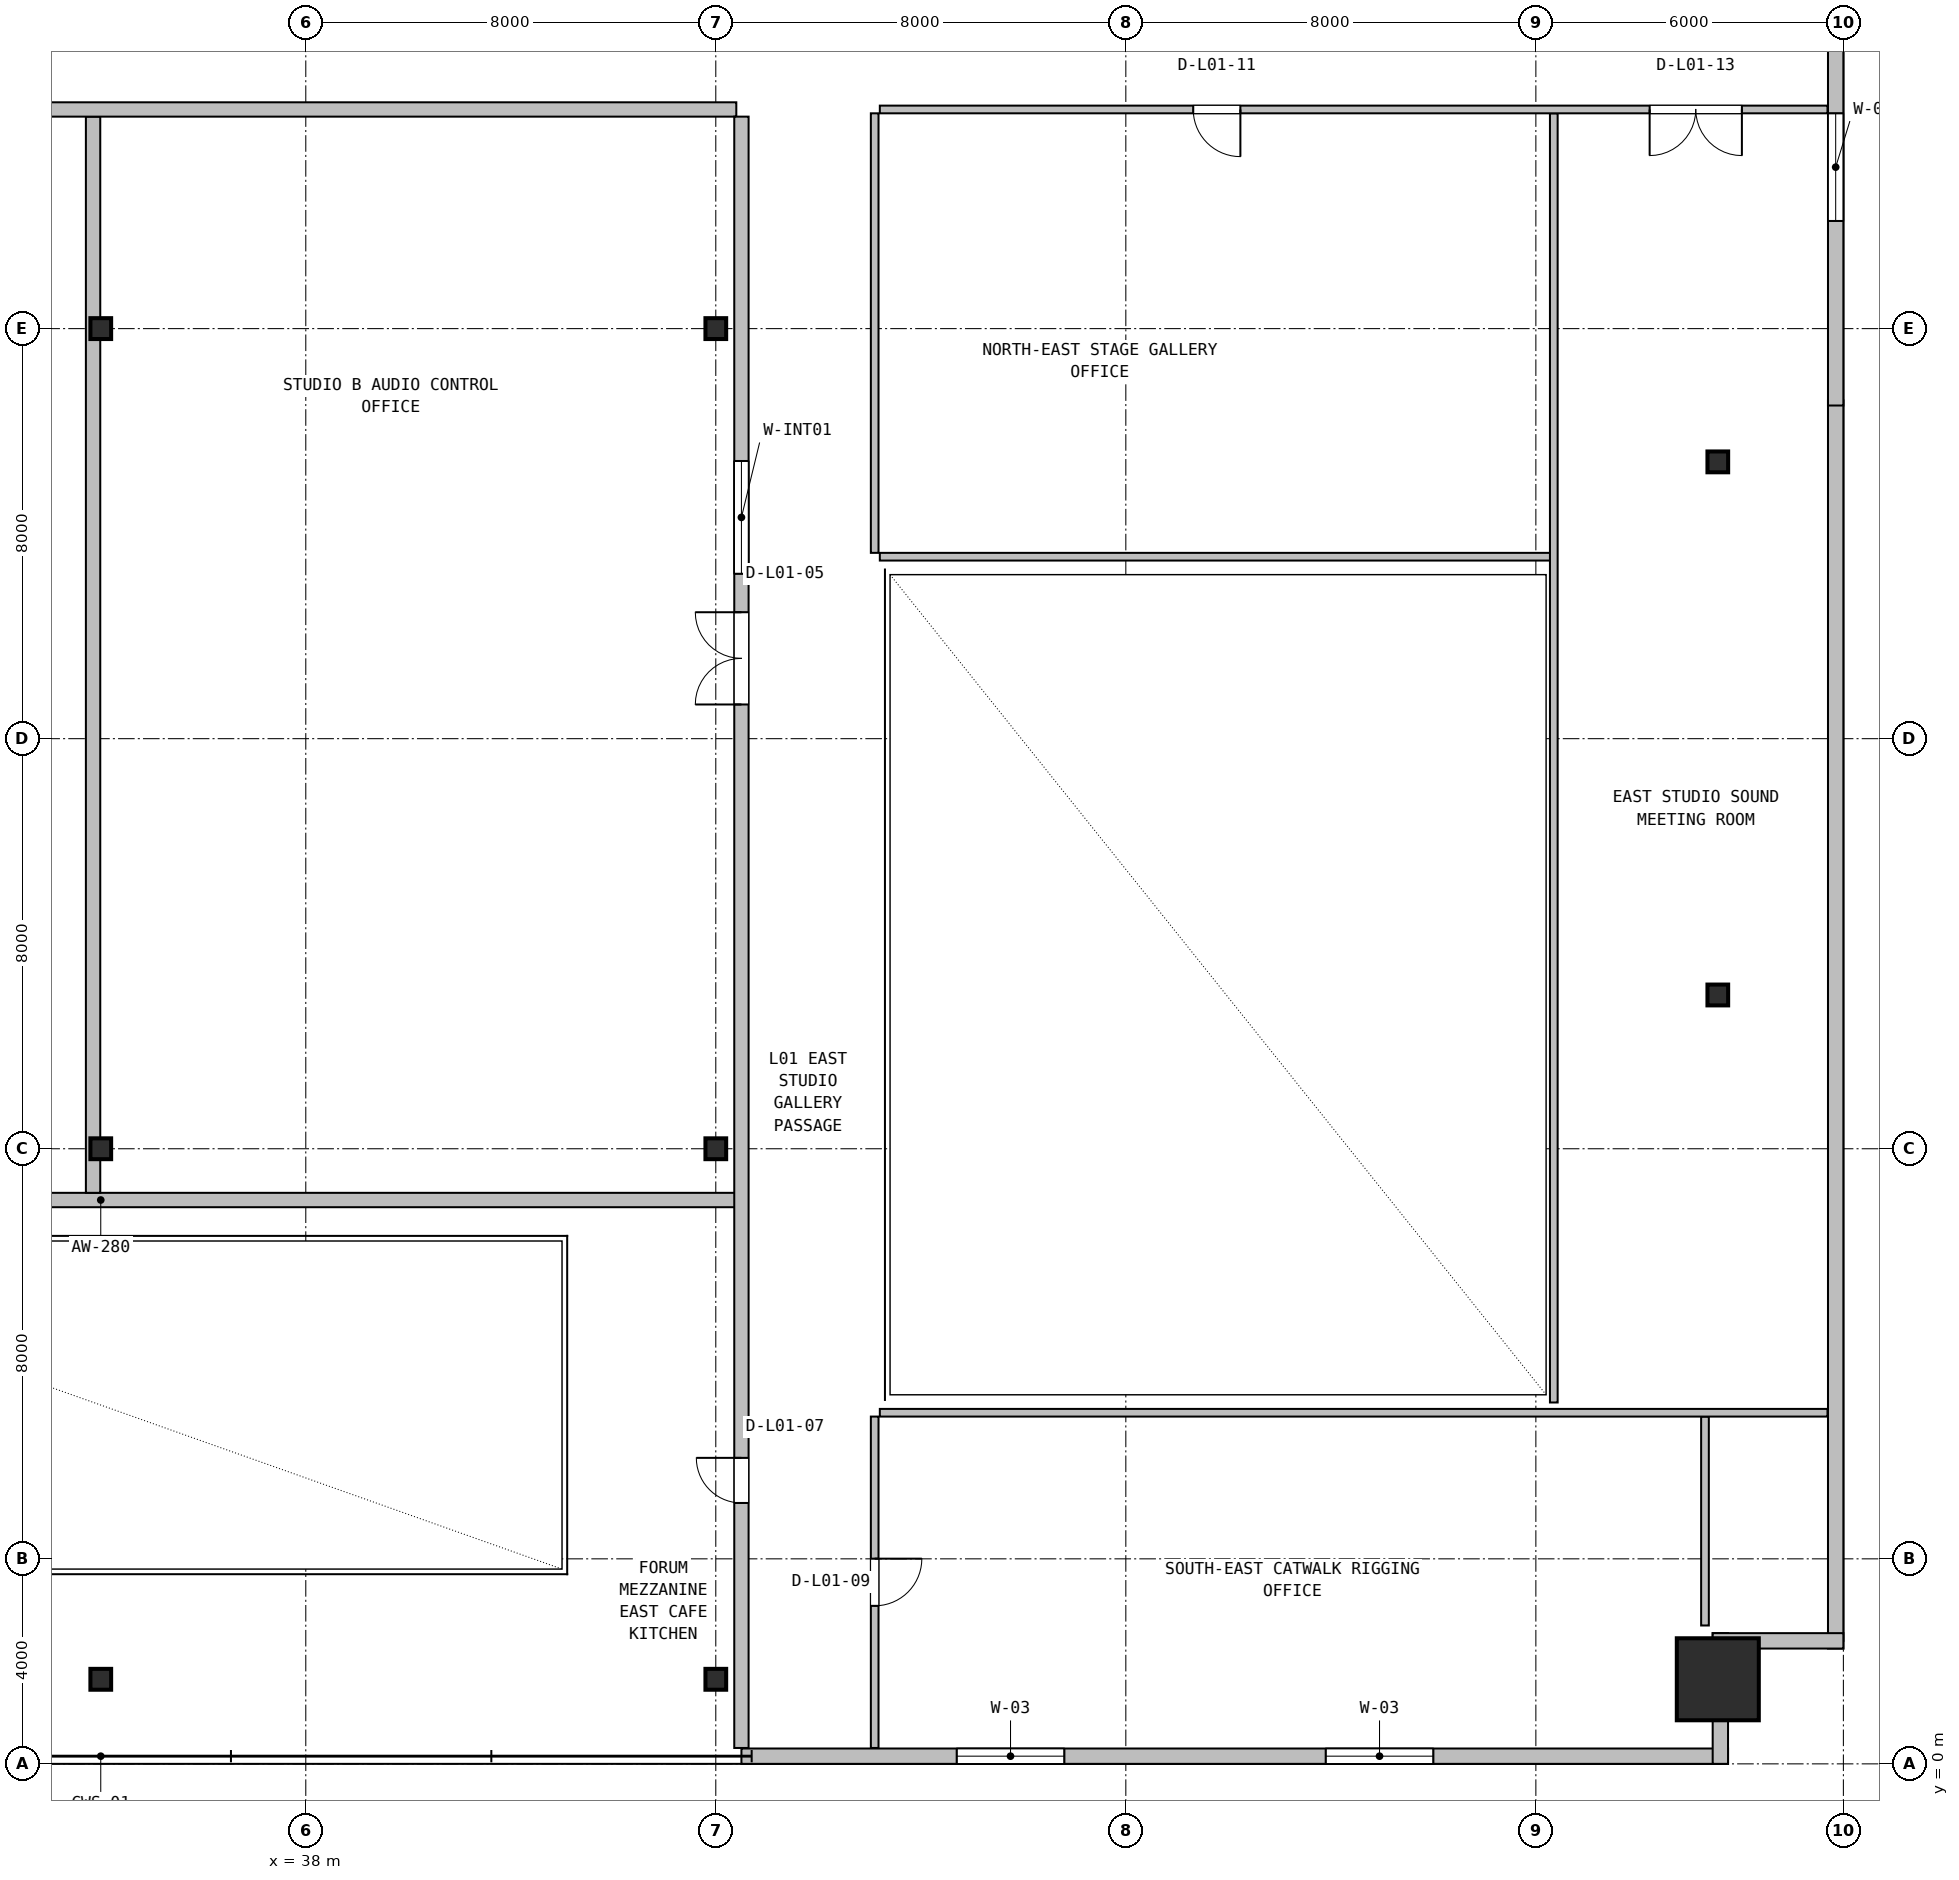
"""IFC4 building model, lengths in metres.
Left out: names, types, materials, properties, quantities, classifications, styles, units other than length and angle.
Written with IfcOpenShell. Run it as: python <this file> out.ifc"""

import sys

from ifc_helpers import new_model, si_unit, direction, frame, frame_2d, origin, origin_2d, place, context, subcontext, project, spatial, rectangle, hollow_rectangle, i_section, extrude, source, transform, mapped, element, fill, save


model = new_model("IFC4")
c1 = context("Model", 3, precision=1e-05, world=origin(), true_north=direction((0.0, 1.0)))
c2 = subcontext(c1, "Body", "Model", "MODEL_VIEW")
j1 = project(units=[si_unit("LENGTHUNIT", "METRE"), si_unit("PLANEANGLEUNIT", "RADIAN")], contexts=[c1])
p1 = place(None, origin())
s1 = spatial("IfcSite", under=j1, at=p1, CompositionType="ELEMENT")
p2 = place(p1, origin())
s2 = spatial("IfcBuilding", under=s1, at=p2, CompositionType="ELEMENT")
p3 = place(p2, frame((0.0, 0.0, 6.0)))
s3 = spatial("IfcBuildingStorey", under=s2, at=p3, CompositionType="ELEMENT", Elevation=6.0)
m1 = source(origin(), c2, "Body", "SweptSolid", [
    extrude(hollow_rectangle(XDim=1.6, YDim=1.6, WallThickness=0.06, at=origin_2d()), origin(), (0.0, 0.0, 1.0), 5.4),
])
p4 = place(p3, frame((65.55, 1.65, 0.0), z_axis=(0.0, 0.0, 1.0), x_axis=(1.0, 0.0, 0.0)))
e1 = element("IfcColumn", 1, at=p4, inside=s3, PredefinedType="COLUMN", context=c2, shape_type="MappedRepresentation", body=[
    mapped(m1, transform((0.0, 0.0, 0.0), x_axis=(1.0, 0.0, 0.0), y_axis=(0.0, 1.0, 0.0), z_axis=(0.0, 0.0, 1.0), scale=1.0)),
])
m2 = source(origin(), c2, "Body", "SweptSolid", [
    extrude(i_section(OverallWidth=0.404, OverallDepth=0.407, WebThickness=0.027, FlangeThickness=0.044, FilletRadius=0.018, at=origin_2d()), origin(), (0.0, 0.0, 1.0), 5.4),
])
for number, where, z_axis, x_axis in (
    (2, (34.0, 1.65, 0.0), (0.0, 0.0, 1.0), (1.0, 0.0, 0.0)),
    (3, (46.0, 1.65, 0.0), (0.0, 0.0, 1.0), (1.0, 0.0, 0.0)),
    (4, (34.0, 12.0, 0.0), (0.0, 0.0, 1.0), (1.0, 0.0, 0.0)),
    (5, (46.0, 12.0, 0.0), (0.0, 0.0, 1.0), (1.0, 0.0, 0.0)),
    (6, (34.0, 28.0, 0.0), (0.0, 0.0, 1.0), (1.0, 0.0, 0.0)),
    (7, (46.0, 28.0, 0.0), (0.0, 0.0, 1.0), (1.0, 0.0, 0.0)),
    (8, (65.55, 15.0, 0.0), (0.0, 0.0, 1.0), (1.0, 0.0, 0.0)),
    (9, (65.55, 25.4, 0.0), (0.0, 0.0, 1.0), (1.0, 0.0, 0.0)),
):
    element("IfcColumn", number, at=place(p3, frame(where, z_axis=z_axis, x_axis=x_axis)), inside=s3, PredefinedType="COLUMN", context=c2, shape_type="MappedRepresentation", body=[
        mapped(m2, transform((0.0, 0.0, 0.0), x_axis=(1.0, 0.0, 0.0), y_axis=(0.0, 1.0, 0.0), z_axis=(0.0, 0.0, 1.0), scale=1.0)),
    ])
p5 = place(p3, frame((46.5, 0.15, 0.0), z_axis=(0.0, 0.0, 1.0), x_axis=(1.0, 0.0, 0.0)))
e10 = element("IfcWall", 10, at=p5, inside=s3, PredefinedType="SOLIDWALL", context=c2, shape_type="SweptSolid", body=[
    extrude(rectangle(XDim=19.25, YDim=0.3, at=frame_2d((9.625, 0.0))), origin(), (0.0, 0.0, 1.0), 5.1),
])
p6 = place(p5, frame((4.2, 0.0, 0.9)))
e11 = element("IfcOpeningElement", 11, at=p6, cuts=e10, PredefinedType="OPENING", context=c2, shape_type="SweptSolid", body=[
    extrude(rectangle(XDim=2.1, YDim=2.1, at=frame_2d((1.05, 1.05))), frame((0.0, 0.16, 0.0), z_axis=(0.0, -1.0, 0.0), x_axis=(1.0, 0.0, 0.0)), (0.0, 0.0, 1.0), 0.32),
])
p7 = place(p5, frame((11.4, 0.0, 0.9)))
e12 = element("IfcOpeningElement", 12, at=p7, cuts=e10, PredefinedType="OPENING", context=c2, shape_type="SweptSolid", body=[
    extrude(rectangle(XDim=2.1, YDim=2.1, at=frame_2d((1.05, 1.05))), frame((0.0, 0.16, 0.0), z_axis=(0.0, -1.0, 0.0), x_axis=(1.0, 0.0, 0.0)), (0.0, 0.0, 1.0), 0.32),
])
p8 = place(p3, frame((67.85, 2.25, 0.0), z_axis=(0.0, 0.0, 1.0), x_axis=(0.0, 1.0, 0.0)))
e13 = element("IfcWall", 13, at=p8, inside=s3, PredefinedType="SOLIDWALL", context=c2, shape_type="SweptSolid", body=[
    extrude(rectangle(XDim=24.35, YDim=0.3, at=frame_2d((12.175, 0.0))), origin(), (0.0, 0.0, 1.0), 5.1),
])
p9 = place(p3, frame((67.85, 26.5, 0.0), z_axis=(0.0, 0.0, 1.0), x_axis=(0.0, 1.0, 0.0)))
e14 = element("IfcWall", 14, at=p9, inside=s3, PredefinedType="SOLIDWALL", context=c2, shape_type="SweptSolid", body=[
    extrude(rectangle(XDim=19.25, YDim=0.3, at=frame_2d((9.625, 0.0))), origin(), (0.0, 0.0, 1.0), 5.1),
])
p10 = place(p9, frame((3.6, 0.0, 0.9)))
e15 = element("IfcOpeningElement", 15, at=p10, cuts=e14, PredefinedType="OPENING", context=c2, shape_type="SweptSolid", body=[
    extrude(rectangle(XDim=2.1, YDim=2.1, at=frame_2d((1.05, 1.05))), frame((0.0, 0.16, 0.0), z_axis=(0.0, -1.0, 0.0), x_axis=(1.0, 0.0, 0.0)), (0.0, 0.0, 1.0), 0.32),
])
p11 = place(p9, frame((12.8, 0.0, 0.9)))
e16 = element("IfcOpeningElement", 16, at=p11, cuts=e14, PredefinedType="OPENING", context=c2, shape_type="SweptSolid", body=[
    extrude(rectangle(XDim=2.1, YDim=2.1, at=frame_2d((1.05, 1.05))), frame((0.0, 0.16, 0.0), z_axis=(0.0, -1.0, 0.0), x_axis=(1.0, 0.0, 0.0)), (0.0, 0.0, 1.0), 0.32),
])
for number, where, z_axis, x_axis in (
    (17, (65.6, 0.0, 0.0), (0.0, 0.0, 1.0), (0.0, 1.0, 0.0)),
    (18, (65.45, 2.4, 0.0), (0.0, 0.0, 1.0), (1.0, 0.0, 0.0)),
):
    element("IfcWall", number, at=place(p3, frame(where, z_axis=z_axis, x_axis=x_axis)), inside=s3, PredefinedType="SOLIDWALL", context=c2, shape_type="SweptSolid", body=[
        extrude(rectangle(XDim=2.55, YDim=0.3, at=frame_2d((1.275, 0.0))), origin(), (0.0, 0.0, 1.0), 4.183),
    ])
p12 = place(p3, frame((21.6, 11.0, 0.0), z_axis=(0.0, 0.0, 1.0), x_axis=(1.0, 0.0, 0.0)))
e19 = element("IfcWall", 19, at=p12, inside=s3, PredefinedType="SOLIDWALL", context=c2, shape_type="SweptSolid", body=[
    extrude(rectangle(XDim=24.8, YDim=0.28, at=frame_2d((12.4, 0.0))), origin(), (0.0, 0.0, 1.0), 4.183),
])
p13 = place(p3, frame((33.85, 11.14, 0.0), z_axis=(0.0, 0.0, 1.0), x_axis=(0.0, 1.0, 0.0)))
e20 = element("IfcWall", 20, at=p13, inside=s3, PredefinedType="SOLIDWALL", context=c2, shape_type="SweptSolid", body=[
    extrude(rectangle(XDim=20.995, YDim=0.28, at=frame_2d((10.498, 0.0))), origin(), (0.0, 0.0, 1.0), 4.183),
])
p14 = place(p3, frame((21.6, 32.275, 0.0), z_axis=(0.0, 0.0, 1.0), x_axis=(1.0, 0.0, 0.0)))
e21 = element("IfcWall", 21, at=p14, inside=s3, PredefinedType="SOLIDWALL", context=c2, shape_type="SweptSolid", body=[
    extrude(rectangle(XDim=24.8, YDim=0.28, at=frame_2d((12.4, 0.0))), origin(), (0.0, 0.0, 1.0), 4.183),
])
p15 = place(p3, frame((46.5, 0.31, 0.0), z_axis=(0.0, 0.0, 1.0), x_axis=(0.0, 1.0, 0.0)))
e22 = element("IfcWall", 22, at=p15, inside=s3, PredefinedType="SOLIDWALL", context=c2, shape_type="SweptSolid", body=[
    extrude(rectangle(XDim=31.825, YDim=0.28, at=frame_2d((15.913, 0.0))), origin(), (0.0, 0.0, 1.0), 4.183),
])
p16 = place(p15, frame((20.357, 0.0, 0.0)))
e23 = element("IfcOpeningElement", 23, at=p16, cuts=e22, PredefinedType="OPENING", context=c2, shape_type="SweptSolid", body=[
    extrude(rectangle(XDim=1.8, YDim=2.25, at=frame_2d((0.9, 1.125))), frame((0.0, 0.15, 0.0), z_axis=(0.0, -1.0, 0.0), x_axis=(1.0, 0.0, 0.0)), (0.0, 0.0, 1.0), 0.3),
])
p17 = place(p15, frame((22.907, 0.0, 0.95)))
e24 = element("IfcOpeningElement", 24, at=p17, cuts=e22, PredefinedType="OPENING", context=c2, shape_type="SweptSolid", body=[
    extrude(rectangle(XDim=2.2, YDim=1.3, at=frame_2d((1.1, 0.65))), frame((0.0, 0.15, 0.0), z_axis=(0.0, -1.0, 0.0), x_axis=(1.0, 0.0, 0.0)), (0.0, 0.0, 1.0), 0.3),
])
p18 = place(p15, frame((4.78, 0.0, 0.0)))
e25 = element("IfcOpeningElement", 25, at=p18, cuts=e22, PredefinedType="OPENING", context=c2, shape_type="SweptSolid", body=[
    extrude(rectangle(XDim=0.88, YDim=2.06, at=frame_2d((0.44, 1.03))), frame((0.0, 0.15, 0.0), z_axis=(0.0, -1.0, 0.0), x_axis=(1.0, 0.0, 0.0)), (0.0, 0.0, 1.0), 0.3),
])
p19 = place(p3, frame((65.3, 2.7, 0.0), z_axis=(0.0, 0.0, 1.0), x_axis=(0.0, 1.0, 0.0)))
e26 = element("IfcWall", 26, at=p19, inside=s3, PredefinedType="PARTITIONING", context=c2, shape_type="SweptSolid", body=[
    extrude(rectangle(XDim=4.075, YDim=0.15, at=frame_2d((2.038, 0.0))), origin(), (0.0, 0.0, 1.0), 4.183),
])
p20 = place(p3, frame((49.2, 6.85, 0.0), z_axis=(0.0, 0.0, 1.0), x_axis=(1.0, 0.0, 0.0)))
e27 = element("IfcWall", 27, at=p20, inside=s3, PredefinedType="PARTITIONING", context=c2, shape_type="SweptSolid", body=[
    extrude(rectangle(XDim=18.49, YDim=0.15, at=frame_2d((9.245, 0.0))), origin(), (0.0, 0.0, 1.0), 4.183),
])
p21 = place(p3, frame((49.1, 0.31, 0.0), z_axis=(0.0, 0.0, 1.0), x_axis=(0.0, 1.0, 0.0)))
e28 = element("IfcWall", 28, at=p21, inside=s3, PredefinedType="PARTITIONING", context=c2, shape_type="SweptSolid", body=[
    extrude(rectangle(XDim=6.465, YDim=0.15, at=frame_2d((3.232, 0.0))), origin(), (0.0, 0.0, 1.0), 4.183),
])
p22 = place(p21, frame((2.773, 0.0, 0.0)))
e29 = element("IfcOpeningElement", 29, at=p22, cuts=e28, PredefinedType="OPENING", context=c2, shape_type="SweptSolid", body=[
    extrude(rectangle(XDim=0.92, YDim=2.08, at=frame_2d((0.46, 1.04))), frame((0.0, 0.085, 0.0), z_axis=(0.0, -1.0, 0.0), x_axis=(1.0, 0.0, 0.0)), (0.0, 0.0, 1.0), 0.17),
])
p23 = place(p3, frame((49.2, 23.55, 0.0), z_axis=(0.0, 0.0, 1.0), x_axis=(1.0, 0.0, 0.0)))
e30 = element("IfcWall", 30, at=p23, inside=s3, PredefinedType="PARTITIONING", context=c2, shape_type="SweptSolid", body=[
    extrude(rectangle(XDim=13.15, YDim=0.15, at=frame_2d((6.575, 0.0))), origin(), (0.0, 0.0, 1.0), 5.1),
])
p24 = place(p3, frame((62.35, 7.05, 0.0), z_axis=(0.0, 0.0, 1.0), x_axis=(0.0, 1.0, 0.0)))
e31 = element("IfcWall", 31, at=p24, inside=s3, PredefinedType="PARTITIONING", context=c2, shape_type="SweptSolid", body=[
    extrude(rectangle(XDim=25.15, YDim=0.15, at=frame_2d((12.575, 0.0))), origin(), (0.0, 0.0, 1.0), 4.183),
])
p25 = place(p3, frame((49.2, 32.275, 0.0), z_axis=(0.0, 0.0, 1.0), x_axis=(1.0, 0.0, 0.0)))
e32 = element("IfcWall", 32, at=p25, inside=s3, PredefinedType="PARTITIONING", context=c2, shape_type="SweptSolid", body=[
    extrude(rectangle(XDim=18.49, YDim=0.15, at=frame_2d((9.245, 0.0))), origin(), (0.0, 0.0, 1.0), 4.183),
])
p26 = place(p25, frame((6.115, 0.0, 0.0)))
e33 = element("IfcOpeningElement", 33, at=p26, cuts=e32, PredefinedType="OPENING", context=c2, shape_type="SweptSolid", body=[
    extrude(rectangle(XDim=0.92, YDim=2.08, at=frame_2d((0.46, 1.04))), frame((0.0, 0.085, 0.0), z_axis=(0.0, -1.0, 0.0), x_axis=(1.0, 0.0, 0.0)), (0.0, 0.0, 1.0), 0.17),
])
p27 = place(p25, frame((15.02, 0.0, 0.0)))
e34 = element("IfcOpeningElement", 34, at=p27, cuts=e32, PredefinedType="OPENING", context=c2, shape_type="SweptSolid", body=[
    extrude(rectangle(XDim=1.8, YDim=2.25, at=frame_2d((0.9, 1.125))), frame((0.0, 0.085, 0.0), z_axis=(0.0, -1.0, 0.0), x_axis=(1.0, 0.0, 0.0)), (0.0, 0.0, 1.0), 0.17),
])
p28 = place(p3, frame((49.1, 23.625, 0.0), z_axis=(0.0, 0.0, 1.0), x_axis=(0.0, 1.0, 0.0)))
e35 = element("IfcWall", 35, at=p28, inside=s3, PredefinedType="PARTITIONING", context=c2, shape_type="SweptSolid", body=[
    extrude(rectangle(XDim=8.575, YDim=0.15, at=frame_2d((4.288, 0.0))), origin(), (0.0, 0.0, 1.0), 4.183),
])
m3 = source(origin(), c2, "Body", "SweptSolid", [
    extrude(rectangle(XDim=2.1, YDim=2.1, at=frame_2d((1.05, 1.05))), frame((0.0, 0.03, 0.0), z_axis=(0.0, -1.0, 0.0), x_axis=(1.0, 0.0, 0.0)), (0.0, 0.0, 1.0), 0.06),
])
p29 = place(p6, origin())
e36 = element("IfcWindow", 36, at=p29, inside=s3, PartitioningType="DOUBLE_PANEL_VERTICAL", PredefinedType="WINDOW", context=c2, shape_type="MappedRepresentation", body=[
    mapped(m3, transform((0.0, 0.0, 0.0), x_axis=(1.0, 0.0, 0.0), y_axis=(0.0, 1.0, 0.0), z_axis=(0.0, 0.0, 1.0), scale=1.0)),
])
fill(e11, e36)
p30 = place(p7, origin())
e37 = element("IfcWindow", 37, at=p30, inside=s3, PartitioningType="DOUBLE_PANEL_VERTICAL", PredefinedType="WINDOW", context=c2, shape_type="MappedRepresentation", body=[
    mapped(m3, transform((0.0, 0.0, 0.0), x_axis=(1.0, 0.0, 0.0), y_axis=(0.0, 1.0, 0.0), z_axis=(0.0, 0.0, 1.0), scale=1.0)),
])
fill(e12, e37)
p31 = place(p10, origin())
e38 = element("IfcWindow", 38, at=p31, inside=s3, PartitioningType="DOUBLE_PANEL_VERTICAL", PredefinedType="WINDOW", context=c2, shape_type="MappedRepresentation", body=[
    mapped(m3, transform((0.0, 0.0, 0.0), x_axis=(1.0, 0.0, 0.0), y_axis=(0.0, 1.0, 0.0), z_axis=(0.0, 0.0, 1.0), scale=1.0)),
])
fill(e15, e38)
m4 = source(origin(), c2, "Body", "SweptSolid", [
    extrude(rectangle(XDim=1.8, YDim=2.25, at=frame_2d((0.9, 1.125))), frame((0.0, 0.025, 0.0), z_axis=(0.0, -1.0, 0.0), x_axis=(1.0, 0.0, 0.0)), (0.0, 0.0, 1.0), 0.05),
])
p32 = place(p16, origin())
e39 = element("IfcDoor", 39, at=p32, inside=s3, OperationType="DOUBLE_DOOR_SINGLE_SWING", PredefinedType="DOOR", context=c2, shape_type="MappedRepresentation", body=[
    mapped(m4, transform((0.0, 0.0, 0.0), x_axis=(1.0, 0.0, 0.0), y_axis=(0.0, 1.0, 0.0), z_axis=(0.0, 0.0, 1.0), scale=1.0)),
])
fill(e23, e39)
m5 = source(origin(), c2, "Body", "SweptSolid", [
    extrude(rectangle(XDim=2.2, YDim=1.3, at=frame_2d((1.1, 0.65))), frame((0.0, 0.03, 0.0), z_axis=(0.0, -1.0, 0.0), x_axis=(1.0, 0.0, 0.0)), (0.0, 0.0, 1.0), 0.06),
])
p33 = place(p17, origin())
e40 = element("IfcWindow", 40, at=p33, inside=s3, PartitioningType="SINGLE_PANEL", PredefinedType="WINDOW", context=c2, shape_type="MappedRepresentation", body=[
    mapped(m5, transform((0.0, 0.0, 0.0), x_axis=(1.0, 0.0, 0.0), y_axis=(0.0, 1.0, 0.0), z_axis=(0.0, 0.0, 1.0), scale=1.0)),
])
fill(e24, e40)
m6 = source(origin(), c2, "Body", "SweptSolid", [
    extrude(rectangle(XDim=0.88, YDim=2.06, at=frame_2d((0.44, 1.03))), frame((0.0, 0.025, 0.0), z_axis=(0.0, -1.0, 0.0), x_axis=(1.0, 0.0, 0.0)), (0.0, 0.0, 1.0), 0.05),
])
p34 = place(p18, origin())
e41 = element("IfcDoor", 41, at=p34, inside=s3, OperationType="SINGLE_SWING_RIGHT", PredefinedType="DOOR", context=c2, shape_type="MappedRepresentation", body=[
    mapped(m6, transform((0.0, 0.0, 0.0), x_axis=(1.0, 0.0, 0.0), y_axis=(0.0, 1.0, 0.0), z_axis=(0.0, 0.0, 1.0), scale=1.0)),
])
fill(e25, e41)
m7 = source(origin(), c2, "Body", "SweptSolid", [
    extrude(rectangle(XDim=0.92, YDim=2.08, at=frame_2d((0.46, 1.04))), frame((0.0, 0.025, 0.0), z_axis=(0.0, -1.0, 0.0), x_axis=(1.0, 0.0, 0.0)), (0.0, 0.0, 1.0), 0.05),
])
p35 = place(p22, frame((0.92, 0.0, 0.0), z_axis=(0.0, 0.0, 1.0), x_axis=(-1.0, 0.0, 0.0)))
e42 = element("IfcDoor", 42, at=p35, inside=s3, OperationType="SINGLE_SWING_RIGHT", PredefinedType="DOOR", context=c2, shape_type="MappedRepresentation", body=[
    mapped(m7, transform((0.0, 0.0, 0.0), x_axis=(1.0, 0.0, 0.0), y_axis=(0.0, 1.0, 0.0), z_axis=(0.0, 0.0, 1.0), scale=1.0)),
])
fill(e29, e42)
p36 = place(p26, frame((0.92, 0.0, 0.0), z_axis=(0.0, 0.0, 1.0), x_axis=(-1.0, 0.0, 0.0)))
e43 = element("IfcDoor", 43, at=p36, inside=s3, OperationType="SINGLE_SWING_RIGHT", PredefinedType="DOOR", context=c2, shape_type="MappedRepresentation", body=[
    mapped(m7, transform((0.0, 0.0, 0.0), x_axis=(1.0, 0.0, 0.0), y_axis=(0.0, 1.0, 0.0), z_axis=(0.0, 0.0, 1.0), scale=1.0)),
])
fill(e33, e43)
p37 = place(p27, frame((1.8, 0.0, 0.0), z_axis=(0.0, 0.0, 1.0), x_axis=(-1.0, 0.0, 0.0)))
e44 = element("IfcDoor", 44, at=p37, inside=s3, OperationType="DOUBLE_DOOR_SINGLE_SWING", PredefinedType="DOOR", context=c2, shape_type="MappedRepresentation", body=[
    mapped(m4, transform((0.0, 0.0, 0.0), x_axis=(1.0, 0.0, 0.0), y_axis=(0.0, 1.0, 0.0), z_axis=(0.0, 0.0, 1.0), scale=1.0)),
])
fill(e34, e44)
save(model, sys.argv[1])
